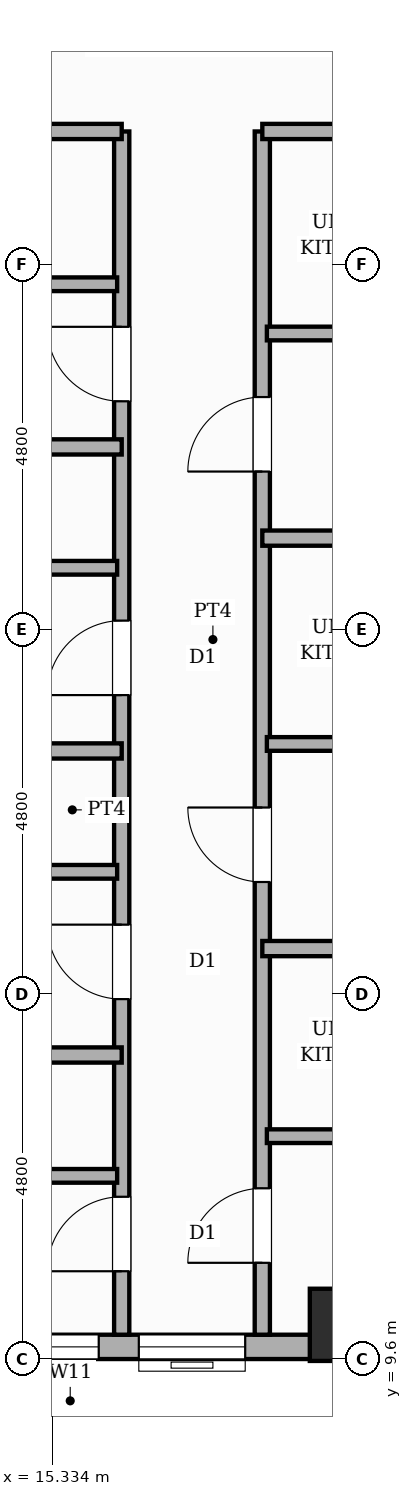
"""IFC4 building model, lengths in metres.
Left out: names, types, materials, properties, quantities, classifications, styles, units other than length and angle.
Written with IfcOpenShell. Run it as: python <this file> out.ifc"""

import sys

from ifc_helpers import new_model, si_unit, direction, frame, frame_2d, origin, origin_2d, place, context, subcontext, project, spatial, rectangle, extrude, element, fill, save


model = new_model("IFC4")
c1 = context("Model", 3, precision=1e-05, world=origin(), true_north=direction((0.0, 1.0)))
c2 = subcontext(c1, "Body", "Model", "MODEL_VIEW")
j1 = project(units=[si_unit("LENGTHUNIT", "METRE"), si_unit("PLANEANGLEUNIT", "RADIAN")], contexts=[c1])
p1 = place(None, origin())
s1 = spatial("IfcSite", under=j1, at=p1, CompositionType="ELEMENT")
p2 = place(p1, origin())
s2 = spatial("IfcBuilding", under=s1, at=p2, CompositionType="ELEMENT")
p3 = place(p2, frame((0.0, 0.0, 107.2)))
s3 = spatial("IfcBuildingStorey", under=s2, at=p3, CompositionType="ELEMENT", Elevation=107.2)
p4 = place(p3, frame((19.2, 10.05, 0.0), z_axis=(0.0, 0.0, 1.0), x_axis=(1.0, 0.0, 0.0)))
e1 = element("IfcColumn", 1, at=p4, inside=s3, PredefinedType="COLUMN", context=c2, shape_type="SweptSolid", body=[
    extrude(rectangle(XDim=0.95, YDim=0.95, at=origin_2d()), origin(), (0.0, 0.0, 1.0), 3.6),
])
p5 = place(p3, frame((21.6, 9.76, 0.0), z_axis=(0.0, 0.0, 1.0), x_axis=(-1.0, 0.0, 0.0)))
e2 = element("IfcWall", 2, at=p5, inside=s3, PredefinedType="STANDARD", context=c2, shape_type="SweptSolid", body=[
    extrude(rectangle(XDim=14.4, YDim=0.32, at=frame_2d((7.2, 0.0))), origin(), (0.0, 0.0, 1.0), 2.54),
])
p6 = place(p5, frame((5.653, 0.0, 0.45)))
e3 = element("IfcOpeningElement", 3, at=p6, cuts=e2, PredefinedType="OPENING", context=c2, shape_type="SweptSolid", body=[
    extrude(rectangle(XDim=0.75, YDim=1.8, at=frame_2d((0.375, 0.9))), frame((0.0, 0.17, 0.0), z_axis=(0.0, -1.0, 0.0), x_axis=(1.0, 0.0, 0.0)), (0.0, 0.0, 1.0), 0.34),
])
p7 = place(p5, frame((0.282, 0.0, 0.65)))
e4 = element("IfcOpeningElement", 4, at=p7, cuts=e2, PredefinedType="OPENING", context=c2, shape_type="SweptSolid", body=[
    extrude(rectangle(XDim=1.4, YDim=1.1, at=frame_2d((0.7, 0.55))), frame((0.0, 0.17, 0.0), z_axis=(0.0, -1.0, 0.0), x_axis=(1.0, 0.0, 0.0)), (0.0, 0.0, 1.0), 0.34),
])
p8 = place(p5, frame((3.725, 0.0, 0.65)))
e5 = element("IfcOpeningElement", 5, at=p8, cuts=e2, PredefinedType="OPENING", context=c2, shape_type="SweptSolid", body=[
    extrude(rectangle(XDim=1.4, YDim=1.1, at=frame_2d((0.7, 0.55))), frame((0.0, 0.17, 0.0), z_axis=(0.0, -1.0, 0.0), x_axis=(1.0, 0.0, 0.0)), (0.0, 0.0, 1.0), 0.34),
])
p9 = place(p3, frame((16.25, 9.92, 0.0), z_axis=(0.0, 0.0, 1.0), x_axis=(0.0, 1.0, 0.0)))
e6 = element("IfcWall", 6, at=p9, inside=s3, PredefinedType="PARTITIONING", context=c2, shape_type="SweptSolid", body=[
    extrude(rectangle(XDim=15.83, YDim=0.2, at=frame_2d((7.915, 0.0))), origin(), (0.0, 0.0, 1.0), 3.36),
])
p10 = place(p9, frame((0.835, 0.0, 0.0)))
e7 = element("IfcOpeningElement", 7, at=p10, cuts=e6, PredefinedType="OPENING", context=c2, shape_type="SweptSolid", body=[
    extrude(rectangle(XDim=0.98, YDim=2.18, at=frame_2d((0.49, 1.09))), frame((0.0, 0.11, 0.0), z_axis=(0.0, -1.0, 0.0), x_axis=(1.0, 0.0, 0.0)), (0.0, 0.0, 1.0), 0.22),
])
p11 = place(p9, frame((4.415, 0.0, 0.0)))
e8 = element("IfcOpeningElement", 8, at=p11, cuts=e6, PredefinedType="OPENING", context=c2, shape_type="SweptSolid", body=[
    extrude(rectangle(XDim=0.98, YDim=2.18, at=frame_2d((0.49, 1.09))), frame((0.0, 0.11, 0.0), z_axis=(0.0, -1.0, 0.0), x_axis=(1.0, 0.0, 0.0)), (0.0, 0.0, 1.0), 0.22),
])
p12 = place(p9, frame((8.415, 0.0, 0.0)))
e9 = element("IfcOpeningElement", 9, at=p12, cuts=e6, PredefinedType="OPENING", context=c2, shape_type="SweptSolid", body=[
    extrude(rectangle(XDim=0.98, YDim=2.18, at=frame_2d((0.49, 1.09))), frame((0.0, 0.11, 0.0), z_axis=(0.0, -1.0, 0.0), x_axis=(1.0, 0.0, 0.0)), (0.0, 0.0, 1.0), 0.22),
])
p13 = place(p9, frame((12.28, 0.0, 0.0)))
e10 = element("IfcOpeningElement", 10, at=p13, cuts=e6, PredefinedType="OPENING", context=c2, shape_type="SweptSolid", body=[
    extrude(rectangle(XDim=0.98, YDim=2.18, at=frame_2d((0.49, 1.09))), frame((0.0, 0.11, 0.0), z_axis=(0.0, -1.0, 0.0), x_axis=(1.0, 0.0, 0.0)), (0.0, 0.0, 1.0), 0.22),
])
p14 = place(p3, frame((18.1, 9.92, 0.0), z_axis=(0.0, 0.0, 1.0), x_axis=(0.0, 1.0, 0.0)))
e11 = element("IfcWall", 11, at=p14, inside=s3, PredefinedType="PARTITIONING", context=c2, shape_type="SweptSolid", body=[
    extrude(rectangle(XDim=15.83, YDim=0.2, at=frame_2d((7.915, 0.0))), origin(), (0.0, 0.0, 1.0), 3.36),
])
p15 = place(p14, frame((0.946, 0.0, 0.0)))
e12 = element("IfcOpeningElement", 12, at=p15, cuts=e11, PredefinedType="OPENING", context=c2, shape_type="SweptSolid", body=[
    extrude(rectangle(XDim=0.98, YDim=2.18, at=frame_2d((0.49, 1.09))), frame((0.0, 0.11, 0.0), z_axis=(0.0, -1.0, 0.0), x_axis=(1.0, 0.0, 0.0)), (0.0, 0.0, 1.0), 0.22),
])
p16 = place(p14, frame((5.956, 0.0, 0.0)))
e13 = element("IfcOpeningElement", 13, at=p16, cuts=e11, PredefinedType="OPENING", context=c2, shape_type="SweptSolid", body=[
    extrude(rectangle(XDim=0.98, YDim=2.18, at=frame_2d((0.49, 1.09))), frame((0.0, 0.11, 0.0), z_axis=(0.0, -1.0, 0.0), x_axis=(1.0, 0.0, 0.0)), (0.0, 0.0, 1.0), 0.22),
])
p17 = place(p14, frame((11.356, 0.0, 0.0)))
e14 = element("IfcOpeningElement", 14, at=p17, cuts=e11, PredefinedType="OPENING", context=c2, shape_type="SweptSolid", body=[
    extrude(rectangle(XDim=0.98, YDim=2.18, at=frame_2d((0.49, 1.09))), frame((0.0, 0.11, 0.0), z_axis=(0.0, -1.0, 0.0), x_axis=(1.0, 0.0, 0.0)), (0.0, 0.0, 1.0), 0.22),
])
p18 = place(p3, frame((5.12, 25.75, 0.0), z_axis=(0.0, 0.0, 1.0), x_axis=(1.0, 0.0, 0.0)))
e15 = element("IfcWall", 15, at=p18, inside=s3, PredefinedType="PARTITIONING", context=c2, shape_type="SweptSolid", body=[
    extrude(rectangle(XDim=11.13, YDim=0.2, at=frame_2d((5.565, 0.0))), origin(), (0.0, 0.0, 1.0), 3.36),
])
p19 = place(p3, frame((18.1, 25.75, 0.0), z_axis=(0.0, 0.0, 1.0), x_axis=(1.0, 0.0, 0.0)))
e16 = element("IfcWall", 16, at=p19, inside=s3, PredefinedType="PARTITIONING", context=c2, shape_type="SweptSolid", body=[
    extrude(rectangle(XDim=5.58, YDim=0.2, at=frame_2d((2.79, 0.0))), origin(), (0.0, 0.0, 1.0), 3.36),
])
p20 = place(p3, frame((5.14, 12.01, 0.0), z_axis=(0.0, 0.0, 1.0), x_axis=(1.0, 0.0, 0.0)))
e17 = element("IfcWall", 17, at=p20, inside=s3, PredefinedType="PLUMBINGWALL", context=c2, shape_type="SweptSolid", body=[
    extrude(rectangle(XDim=11.05, YDim=0.18, at=frame_2d((5.525, 0.0))), origin(), (0.0, 0.0, 1.0), 3.36),
])
p21 = place(p20, frame((2.189, 0.0, 0.0)))
e18 = element("IfcOpeningElement", 18, at=p21, cuts=e17, PredefinedType="OPENING", context=c2, shape_type="SweptSolid", body=[
    extrude(rectangle(XDim=0.86, YDim=2.1, at=frame_2d((0.43, 1.05))), frame((0.0, 0.1, 0.0), z_axis=(0.0, -1.0, 0.0), x_axis=(1.0, 0.0, 0.0)), (0.0, 0.0, 1.0), 0.2),
])
p22 = place(p20, frame((7.804, 0.0, 0.0)))
e19 = element("IfcOpeningElement", 19, at=p22, cuts=e17, PredefinedType="OPENING", context=c2, shape_type="SweptSolid", body=[
    extrude(rectangle(XDim=0.86, YDim=2.1, at=frame_2d((0.43, 1.05))), frame((0.0, 0.1, 0.0), z_axis=(0.0, -1.0, 0.0), x_axis=(1.0, 0.0, 0.0)), (0.0, 0.0, 1.0), 0.2),
])
p23 = place(p3, frame((5.12, 13.6, 0.0), z_axis=(0.0, 0.0, 1.0), x_axis=(1.0, 0.0, 0.0)))
e20 = element("IfcWall", 20, at=p23, inside=s3, PredefinedType="SOLIDWALL", context=c2, shape_type="SweptSolid", body=[
    extrude(rectangle(XDim=11.13, YDim=0.2, at=frame_2d((5.565, 0.0))), origin(), (0.0, 0.0, 1.0), 3.36),
])
p24 = place(p3, frame((5.12, 16.01, 0.0), z_axis=(0.0, 0.0, 1.0), x_axis=(1.0, 0.0, 0.0)))
e21 = element("IfcWall", 21, at=p24, inside=s3, PredefinedType="PLUMBINGWALL", context=c2, shape_type="SweptSolid", body=[
    extrude(rectangle(XDim=11.07, YDim=0.18, at=frame_2d((5.535, 0.0))), origin(), (0.0, 0.0, 1.0), 3.36),
])
p25 = place(p24, frame((2.209, 0.0, 0.0)))
e22 = element("IfcOpeningElement", 22, at=p25, cuts=e21, PredefinedType="OPENING", context=c2, shape_type="SweptSolid", body=[
    extrude(rectangle(XDim=0.86, YDim=2.1, at=frame_2d((0.43, 1.05))), frame((0.0, 0.1, 0.0), z_axis=(0.0, -1.0, 0.0), x_axis=(1.0, 0.0, 0.0)), (0.0, 0.0, 1.0), 0.2),
])
p26 = place(p24, frame((7.824, 0.0, 0.0)))
e23 = element("IfcOpeningElement", 23, at=p26, cuts=e21, PredefinedType="OPENING", context=c2, shape_type="SweptSolid", body=[
    extrude(rectangle(XDim=0.86, YDim=2.1, at=frame_2d((0.43, 1.05))), frame((0.0, 0.1, 0.0), z_axis=(0.0, -1.0, 0.0), x_axis=(1.0, 0.0, 0.0)), (0.0, 0.0, 1.0), 0.2),
])
p27 = place(p3, frame((5.12, 17.6, 0.0), z_axis=(0.0, 0.0, 1.0), x_axis=(1.0, 0.0, 0.0)))
e24 = element("IfcWall", 24, at=p27, inside=s3, PredefinedType="SOLIDWALL", context=c2, shape_type="SweptSolid", body=[
    extrude(rectangle(XDim=11.13, YDim=0.2, at=frame_2d((5.565, 0.0))), origin(), (0.0, 0.0, 1.0), 3.36),
])
p28 = place(p3, frame((5.12, 20.01, 0.0), z_axis=(0.0, 0.0, 1.0), x_axis=(1.0, 0.0, 0.0)))
e25 = element("IfcWall", 25, at=p28, inside=s3, PredefinedType="PLUMBINGWALL", context=c2, shape_type="SweptSolid", body=[
    extrude(rectangle(XDim=11.07, YDim=0.18, at=frame_2d((5.535, 0.0))), origin(), (0.0, 0.0, 1.0), 3.36),
])
p29 = place(p28, frame((2.209, 0.0, 0.0)))
e26 = element("IfcOpeningElement", 26, at=p29, cuts=e25, PredefinedType="OPENING", context=c2, shape_type="SweptSolid", body=[
    extrude(rectangle(XDim=0.86, YDim=2.1, at=frame_2d((0.43, 1.05))), frame((0.0, 0.1, 0.0), z_axis=(0.0, -1.0, 0.0), x_axis=(1.0, 0.0, 0.0)), (0.0, 0.0, 1.0), 0.2),
])
p30 = place(p28, frame((7.824, 0.0, 0.0)))
e27 = element("IfcOpeningElement", 27, at=p30, cuts=e25, PredefinedType="OPENING", context=c2, shape_type="SweptSolid", body=[
    extrude(rectangle(XDim=0.86, YDim=2.1, at=frame_2d((0.43, 1.05))), frame((0.0, 0.1, 0.0), z_axis=(0.0, -1.0, 0.0), x_axis=(1.0, 0.0, 0.0)), (0.0, 0.0, 1.0), 0.2),
])
p31 = place(p3, frame((5.12, 21.6, 0.0), z_axis=(0.0, 0.0, 1.0), x_axis=(1.0, 0.0, 0.0)))
e28 = element("IfcWall", 28, at=p31, inside=s3, PredefinedType="SOLIDWALL", context=c2, shape_type="SweptSolid", body=[
    extrude(rectangle(XDim=11.13, YDim=0.2, at=frame_2d((5.565, 0.0))), origin(), (0.0, 0.0, 1.0), 3.36),
])
p32 = place(p3, frame((5.12, 23.74, 0.0), z_axis=(0.0, 0.0, 1.0), x_axis=(1.0, 0.0, 0.0)))
e29 = element("IfcWall", 29, at=p32, inside=s3, PredefinedType="PLUMBINGWALL", context=c2, shape_type="SweptSolid", body=[
    extrude(rectangle(XDim=11.07, YDim=0.18, at=frame_2d((5.535, 0.0))), origin(), (0.0, 0.0, 1.0), 2.54),
])
p33 = place(p32, frame((2.209, 0.0, 0.0)))
e30 = element("IfcOpeningElement", 30, at=p33, cuts=e29, PredefinedType="OPENING", context=c2, shape_type="SweptSolid", body=[
    extrude(rectangle(XDim=0.86, YDim=2.1, at=frame_2d((0.43, 1.05))), frame((0.0, 0.1, 0.0), z_axis=(0.0, -1.0, 0.0), x_axis=(1.0, 0.0, 0.0)), (0.0, 0.0, 1.0), 0.2),
])
p34 = place(p32, frame((7.824, 0.0, 0.0)))
e31 = element("IfcOpeningElement", 31, at=p34, cuts=e29, PredefinedType="OPENING", context=c2, shape_type="SweptSolid", body=[
    extrude(rectangle(XDim=0.86, YDim=2.1, at=frame_2d((0.43, 1.05))), frame((0.0, 0.1, 0.0), z_axis=(0.0, -1.0, 0.0), x_axis=(1.0, 0.0, 0.0)), (0.0, 0.0, 1.0), 0.2),
])
p35 = place(p3, frame((18.16, 12.532, 0.0), z_axis=(0.0, 0.0, 1.0), x_axis=(1.0, 0.0, 0.0)))
e32 = element("IfcWall", 32, at=p35, inside=s3, PredefinedType="PLUMBINGWALL", context=c2, shape_type="SweptSolid", body=[
    extrude(rectangle(XDim=5.52, YDim=0.18, at=frame_2d((2.76, 0.0))), origin(), (0.0, 0.0, 1.0), 3.36),
])
p36 = place(p35, frame((0.876, 0.0, 0.0)))
e33 = element("IfcOpeningElement", 33, at=p36, cuts=e32, PredefinedType="OPENING", context=c2, shape_type="SweptSolid", body=[
    extrude(rectangle(XDim=0.86, YDim=2.1, at=frame_2d((0.43, 1.05))), frame((0.0, 0.1, 0.0), z_axis=(0.0, -1.0, 0.0), x_axis=(1.0, 0.0, 0.0)), (0.0, 0.0, 1.0), 0.2),
])
p37 = place(p35, frame((3.716, 0.0, 0.0)))
e34 = element("IfcOpeningElement", 34, at=p37, cuts=e32, PredefinedType="OPENING", context=c2, shape_type="SweptSolid", body=[
    extrude(rectangle(XDim=0.86, YDim=2.1, at=frame_2d((0.43, 1.05))), frame((0.0, 0.1, 0.0), z_axis=(0.0, -1.0, 0.0), x_axis=(1.0, 0.0, 0.0)), (0.0, 0.0, 1.0), 0.2),
])
p38 = place(p3, frame((18.1, 15.0, 0.0), z_axis=(0.0, 0.0, 1.0), x_axis=(1.0, 0.0, 0.0)))
e35 = element("IfcWall", 35, at=p38, inside=s3, PredefinedType="SOLIDWALL", context=c2, shape_type="SweptSolid", body=[
    extrude(rectangle(XDim=5.58, YDim=0.2, at=frame_2d((2.79, 0.0))), origin(), (0.0, 0.0, 1.0), 3.36),
])
p39 = place(p3, frame((18.16, 17.692, 0.0), z_axis=(0.0, 0.0, 1.0), x_axis=(1.0, 0.0, 0.0)))
e36 = element("IfcWall", 36, at=p39, inside=s3, PredefinedType="PLUMBINGWALL", context=c2, shape_type="SweptSolid", body=[
    extrude(rectangle(XDim=5.52, YDim=0.18, at=frame_2d((2.76, 0.0))), origin(), (0.0, 0.0, 1.0), 3.36),
])
p40 = place(p39, frame((0.876, 0.0, 0.0)))
e37 = element("IfcOpeningElement", 37, at=p40, cuts=e36, PredefinedType="OPENING", context=c2, shape_type="SweptSolid", body=[
    extrude(rectangle(XDim=0.86, YDim=2.1, at=frame_2d((0.43, 1.05))), frame((0.0, 0.1, 0.0), z_axis=(0.0, -1.0, 0.0), x_axis=(1.0, 0.0, 0.0)), (0.0, 0.0, 1.0), 0.2),
])
p41 = place(p39, frame((3.716, 0.0, 0.0)))
e38 = element("IfcOpeningElement", 38, at=p41, cuts=e36, PredefinedType="OPENING", context=c2, shape_type="SweptSolid", body=[
    extrude(rectangle(XDim=0.86, YDim=2.1, at=frame_2d((0.43, 1.05))), frame((0.0, 0.1, 0.0), z_axis=(0.0, -1.0, 0.0), x_axis=(1.0, 0.0, 0.0)), (0.0, 0.0, 1.0), 0.2),
])
p42 = place(p3, frame((18.1, 20.4, 0.0), z_axis=(0.0, 0.0, 1.0), x_axis=(1.0, 0.0, 0.0)))
e39 = element("IfcWall", 39, at=p42, inside=s3, PredefinedType="SOLIDWALL", context=c2, shape_type="SweptSolid", body=[
    extrude(rectangle(XDim=5.58, YDim=0.2, at=frame_2d((2.79, 0.0))), origin(), (0.0, 0.0, 1.0), 3.36),
])
p43 = place(p3, frame((18.16, 23.092, 0.0), z_axis=(0.0, 0.0, 1.0), x_axis=(1.0, 0.0, 0.0)))
e40 = element("IfcWall", 40, at=p43, inside=s3, PredefinedType="PLUMBINGWALL", context=c2, shape_type="SweptSolid", body=[
    extrude(rectangle(XDim=5.52, YDim=0.18, at=frame_2d((2.76, 0.0))), origin(), (0.0, 0.0, 1.0), 3.36),
])
p44 = place(p43, frame((0.876, 0.0, 0.0)))
e41 = element("IfcOpeningElement", 41, at=p44, cuts=e40, PredefinedType="OPENING", context=c2, shape_type="SweptSolid", body=[
    extrude(rectangle(XDim=0.86, YDim=2.1, at=frame_2d((0.43, 1.05))), frame((0.0, 0.1, 0.0), z_axis=(0.0, -1.0, 0.0), x_axis=(1.0, 0.0, 0.0)), (0.0, 0.0, 1.0), 0.2),
])
p45 = place(p43, frame((3.716, 0.0, 0.0)))
e42 = element("IfcOpeningElement", 42, at=p45, cuts=e40, PredefinedType="OPENING", context=c2, shape_type="SweptSolid", body=[
    extrude(rectangle(XDim=0.86, YDim=2.1, at=frame_2d((0.43, 1.05))), frame((0.0, 0.1, 0.0), z_axis=(0.0, -1.0, 0.0), x_axis=(1.0, 0.0, 0.0)), (0.0, 0.0, 1.0), 0.2),
])
p46 = place(p6, origin())
e43 = element("IfcWindow", 43, at=p46, inside=s3, PartitioningType="SINGLE_PANEL", PredefinedType="WINDOW", context=c2, shape_type="SweptSolid", body=[
    extrude(rectangle(XDim=0.75, YDim=1.8, at=frame_2d((0.375, 0.9))), frame((0.0, 0.03, 0.0), z_axis=(0.0, -1.0, 0.0), x_axis=(1.0, 0.0, 0.0)), (0.0, 0.0, 1.0), 0.06),
])
fill(e3, e43)
p47 = place(p8, origin())
e44 = element("IfcWindow", 44, at=p47, inside=s3, PartitioningType="SINGLE_PANEL", PredefinedType="WINDOW", context=c2, shape_type="SweptSolid", body=[
    extrude(rectangle(XDim=1.4, YDim=1.1, at=frame_2d((0.7, 0.55))), frame((0.0, 0.03, 0.0), z_axis=(0.0, -1.0, 0.0), x_axis=(1.0, 0.0, 0.0)), (0.0, 0.0, 1.0), 0.06),
])
fill(e5, e44)
p48 = place(p10, origin())
e45 = element("IfcDoor", 45, at=p48, inside=s3, OperationType="SINGLE_SWING_LEFT", PredefinedType="DOOR", context=c2, shape_type="SweptSolid", body=[
    extrude(rectangle(XDim=0.98, YDim=2.18, at=frame_2d((0.49, 1.09))), frame((0.0, 0.025, 0.0), z_axis=(0.0, -1.0, 0.0), x_axis=(1.0, 0.0, 0.0)), (0.0, 0.0, 1.0), 0.05),
])
fill(e7, e45)
p49 = place(p11, origin())
e46 = element("IfcDoor", 46, at=p49, inside=s3, OperationType="SINGLE_SWING_RIGHT", PredefinedType="DOOR", context=c2, shape_type="SweptSolid", body=[
    extrude(rectangle(XDim=0.98, YDim=2.18, at=frame_2d((0.49, 1.09))), frame((0.0, 0.025, 0.0), z_axis=(0.0, -1.0, 0.0), x_axis=(1.0, 0.0, 0.0)), (0.0, 0.0, 1.0), 0.05),
])
fill(e8, e46)
p50 = place(p12, origin())
e47 = element("IfcDoor", 47, at=p50, inside=s3, OperationType="SINGLE_SWING_LEFT", PredefinedType="DOOR", context=c2, shape_type="SweptSolid", body=[
    extrude(rectangle(XDim=0.98, YDim=2.18, at=frame_2d((0.49, 1.09))), frame((0.0, 0.025, 0.0), z_axis=(0.0, -1.0, 0.0), x_axis=(1.0, 0.0, 0.0)), (0.0, 0.0, 1.0), 0.05),
])
fill(e9, e47)
p51 = place(p13, origin())
e48 = element("IfcDoor", 48, at=p51, inside=s3, OperationType="SINGLE_SWING_RIGHT", PredefinedType="DOOR", context=c2, shape_type="SweptSolid", body=[
    extrude(rectangle(XDim=0.98, YDim=2.18, at=frame_2d((0.49, 1.09))), frame((0.0, 0.025, 0.0), z_axis=(0.0, -1.0, 0.0), x_axis=(1.0, 0.0, 0.0)), (0.0, 0.0, 1.0), 0.05),
])
fill(e10, e48)
p52 = place(p15, origin())
e49 = element("IfcDoor", 49, at=p52, inside=s3, OperationType="SINGLE_SWING_LEFT", PredefinedType="DOOR", context=c2, shape_type="SweptSolid", body=[
    extrude(rectangle(XDim=0.98, YDim=2.18, at=frame_2d((0.49, 1.09))), frame((0.0, 0.025, 0.0), z_axis=(0.0, -1.0, 0.0), x_axis=(1.0, 0.0, 0.0)), (0.0, 0.0, 1.0), 0.05),
])
fill(e12, e49)
p53 = place(p16, origin())
e50 = element("IfcDoor", 50, at=p53, inside=s3, OperationType="SINGLE_SWING_RIGHT", PredefinedType="DOOR", context=c2, shape_type="SweptSolid", body=[
    extrude(rectangle(XDim=0.98, YDim=2.18, at=frame_2d((0.49, 1.09))), frame((0.0, 0.025, 0.0), z_axis=(0.0, -1.0, 0.0), x_axis=(1.0, 0.0, 0.0)), (0.0, 0.0, 1.0), 0.05),
])
fill(e13, e50)
p54 = place(p17, origin())
e51 = element("IfcDoor", 51, at=p54, inside=s3, OperationType="SINGLE_SWING_LEFT", PredefinedType="DOOR", context=c2, shape_type="SweptSolid", body=[
    extrude(rectangle(XDim=0.98, YDim=2.18, at=frame_2d((0.49, 1.09))), frame((0.0, 0.025, 0.0), z_axis=(0.0, -1.0, 0.0), x_axis=(1.0, 0.0, 0.0)), (0.0, 0.0, 1.0), 0.05),
])
fill(e14, e51)
save(model, sys.argv[1])
